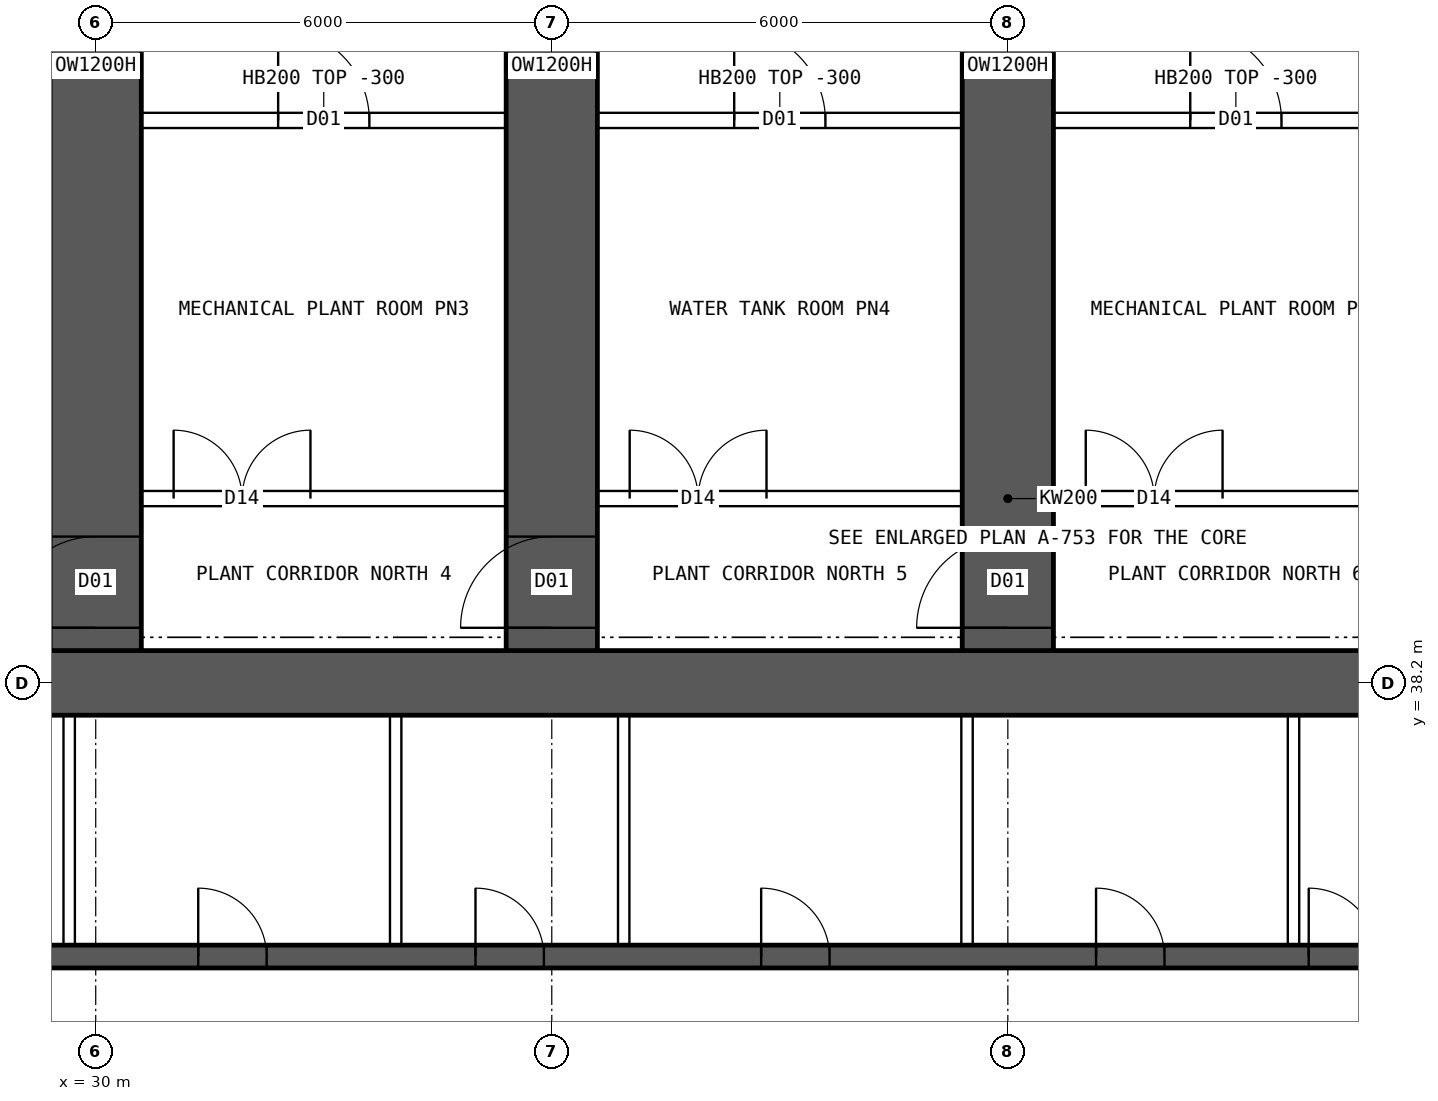
"""IFC4 building model, lengths in metres.
Left out: names, types, materials, properties, quantities, classifications, styles, units other than length and angle.
Written with IfcOpenShell. Run it as: python <this file> out.ifc"""

import sys

from ifc_helpers import new_model, si_unit, direction, frame, frame_2d, origin, place, context, subcontext, project, spatial, rectangle, extrude, element, fill, save


model = new_model("IFC4")
c1 = context("Model", 3, precision=1e-05, world=origin(), true_north=direction((0.0, 1.0)))
c2 = subcontext(c1, "Body", "Model", "MODEL_VIEW")
j1 = project(units=[si_unit("LENGTHUNIT", "METRE"), si_unit("PLANEANGLEUNIT", "RADIAN")], contexts=[c1])
p1 = place(None, origin())
s1 = spatial("IfcSite", under=j1, at=p1, CompositionType="ELEMENT")
p2 = place(p1, origin())
s2 = spatial("IfcBuilding", under=s1, at=p2, CompositionType="ELEMENT")
p3 = place(p2, frame((0.0, 0.0, 201.1)))
s3 = spatial("IfcBuildingStorey", under=s2, at=p3, CompositionType="ELEMENT", Elevation=201.1)
p4 = place(p3, frame((18.0, 38.2, 0.0), z_axis=(0.0, 0.0, 1.0), x_axis=(1.0, 0.0, 0.0)))
e1 = element("IfcWall", 1, at=p4, inside=s3, PredefinedType="SHEAR", context=c2, shape_type="SweptSolid", body=[
    extrude(rectangle(XDim=48.0, YDim=0.85, at=frame_2d((24.0, 0.0))), origin(), (0.0, 0.0, 1.0), 7.2),
])
p5 = place(p3, frame((18.425, 34.6, 0.0), z_axis=(0.0, 0.0, 1.0), x_axis=(1.0, 0.0, 0.0)))
e2 = element("IfcWall", 2, at=p5, inside=s3, PredefinedType="SHEAR", context=c2, shape_type="SweptSolid", body=[
    extrude(rectangle(XDim=47.15, YDim=0.3, at=frame_2d((23.575, 0.0))), origin(), (0.0, 0.0, 1.0), 7.2),
])
p6 = place(p5, frame((0.9, 0.0, 0.0)))
e3 = element("IfcOpeningElement", 3, at=p6, cuts=e2, PredefinedType="OPENING", context=c2, shape_type="SweptSolid", body=[
    extrude(rectangle(XDim=1.1, YDim=2.1, at=frame_2d((0.55, 1.05))), frame((0.0, 0.16, 0.0), z_axis=(0.0, -1.0, 0.0), x_axis=(1.0, 0.0, 0.0)), (0.0, 0.0, 1.0), 0.32),
])
p7 = place(p5, frame((45.15, 0.0, 0.0)))
e4 = element("IfcOpeningElement", 4, at=p7, cuts=e2, PredefinedType="OPENING", context=c2, shape_type="SweptSolid", body=[
    extrude(rectangle(XDim=1.1, YDim=2.1, at=frame_2d((0.55, 1.05))), frame((0.0, 0.16, 0.0), z_axis=(0.0, -1.0, 0.0), x_axis=(1.0, 0.0, 0.0)), (0.0, 0.0, 1.0), 0.32),
])
p8 = place(p5, frame((4.175, 0.0, 0.0)))
e5 = element("IfcOpeningElement", 5, at=p8, cuts=e2, PredefinedType="OPENING", context=c2, shape_type="SweptSolid", body=[
    extrude(rectangle(XDim=0.9, YDim=2.1, at=frame_2d((0.45, 1.05))), frame((0.0, 0.16, 0.0), z_axis=(0.0, -1.0, 0.0), x_axis=(1.0, 0.0, 0.0)), (0.0, 0.0, 1.0), 0.32),
])
p9 = place(p5, frame((42.075, 0.0, 0.0)))
e6 = element("IfcOpeningElement", 6, at=p9, cuts=e2, PredefinedType="OPENING", context=c2, shape_type="SweptSolid", body=[
    extrude(rectangle(XDim=0.9, YDim=2.1, at=frame_2d((0.45, 1.05))), frame((0.0, 0.16, 0.0), z_axis=(0.0, -1.0, 0.0), x_axis=(1.0, 0.0, 0.0)), (0.0, 0.0, 1.0), 0.32),
])
p10 = place(p5, frame((8.95, 0.0, 0.0)))
e7 = element("IfcOpeningElement", 7, at=p10, cuts=e2, PredefinedType="OPENING", context=c2, shape_type="SweptSolid", body=[
    extrude(rectangle(XDim=0.9, YDim=2.1, at=frame_2d((0.45, 1.05))), frame((0.0, 0.16, 0.0), z_axis=(0.0, -1.0, 0.0), x_axis=(1.0, 0.0, 0.0)), (0.0, 0.0, 1.0), 0.32),
])
p11 = place(p5, frame((12.924, 0.0, 0.0)))
e8 = element("IfcOpeningElement", 8, at=p11, cuts=e2, PredefinedType="OPENING", context=c2, shape_type="SweptSolid", body=[
    extrude(rectangle(XDim=0.9, YDim=2.1, at=frame_2d((0.45, 1.05))), frame((0.0, 0.16, 0.0), z_axis=(0.0, -1.0, 0.0), x_axis=(1.0, 0.0, 0.0)), (0.0, 0.0, 1.0), 0.32),
])
p12 = place(p5, frame((16.571, 0.0, 0.0)))
e9 = element("IfcOpeningElement", 9, at=p12, cuts=e2, PredefinedType="OPENING", context=c2, shape_type="SweptSolid", body=[
    extrude(rectangle(XDim=0.9, YDim=2.1, at=frame_2d((0.45, 1.05))), frame((0.0, 0.16, 0.0), z_axis=(0.0, -1.0, 0.0), x_axis=(1.0, 0.0, 0.0)), (0.0, 0.0, 1.0), 0.32),
])
p13 = place(p5, frame((20.33, 0.0, 0.0)))
e10 = element("IfcOpeningElement", 10, at=p13, cuts=e2, PredefinedType="OPENING", context=c2, shape_type="SweptSolid", body=[
    extrude(rectangle(XDim=0.9, YDim=2.1, at=frame_2d((0.45, 1.05))), frame((0.0, 0.16, 0.0), z_axis=(0.0, -1.0, 0.0), x_axis=(1.0, 0.0, 0.0)), (0.0, 0.0, 1.0), 0.32),
])
p14 = place(p5, frame((24.736, 0.0, 0.0)))
e11 = element("IfcOpeningElement", 11, at=p14, cuts=e2, PredefinedType="OPENING", context=c2, shape_type="SweptSolid", body=[
    extrude(rectangle(XDim=0.9, YDim=2.1, at=frame_2d((0.45, 1.05))), frame((0.0, 0.16, 0.0), z_axis=(0.0, -1.0, 0.0), x_axis=(1.0, 0.0, 0.0)), (0.0, 0.0, 1.0), 0.32),
])
p15 = place(p5, frame((27.533, 0.0, 0.0)))
e12 = element("IfcOpeningElement", 12, at=p15, cuts=e2, PredefinedType="OPENING", context=c2, shape_type="SweptSolid", body=[
    extrude(rectangle(XDim=0.9, YDim=2.1, at=frame_2d((0.45, 1.05))), frame((0.0, 0.16, 0.0), z_axis=(0.0, -1.0, 0.0), x_axis=(1.0, 0.0, 0.0)), (0.0, 0.0, 1.0), 0.32),
])
p16 = place(p5, frame((29.906, 0.0, 0.0)))
e13 = element("IfcOpeningElement", 13, at=p16, cuts=e2, PredefinedType="OPENING", context=c2, shape_type="SweptSolid", body=[
    extrude(rectangle(XDim=0.9, YDim=2.1, at=frame_2d((0.45, 1.05))), frame((0.0, 0.16, 0.0), z_axis=(0.0, -1.0, 0.0), x_axis=(1.0, 0.0, 0.0)), (0.0, 0.0, 1.0), 0.32),
])
p17 = place(p5, frame((35.376, 0.0, 0.0)))
e14 = element("IfcOpeningElement", 14, at=p17, cuts=e2, PredefinedType="OPENING", context=c2, shape_type="SweptSolid", body=[
    extrude(rectangle(XDim=0.9, YDim=2.1, at=frame_2d((0.45, 1.05))), frame((0.0, 0.16, 0.0), z_axis=(0.0, -1.0, 0.0), x_axis=(1.0, 0.0, 0.0)), (0.0, 0.0, 1.0), 0.32),
])
p18 = place(p3, frame((30.0, 38.625, 0.0), z_axis=(0.0, 0.0, 1.0), x_axis=(0.0, 1.0, 0.0)))
e15 = element("IfcWall", 15, at=p18, inside=s3, PredefinedType="SHEAR", context=c2, shape_type="SweptSolid", body=[
    extrude(rectangle(XDim=15.375, YDim=1.2, at=frame_2d((7.688, 0.0))), origin(), (0.0, 0.0, 1.0), 7.2),
])
p19 = place(p18, frame((0.3, 0.0, 0.0)))
e16 = element("IfcOpeningElement", 16, at=p19, cuts=e15, PredefinedType="OPENING", context=c2, shape_type="SweptSolid", body=[
    extrude(rectangle(XDim=1.2, YDim=2.1, at=frame_2d((0.6, 1.05))), frame((0.0, 0.61, 0.0), z_axis=(0.0, -1.0, 0.0), x_axis=(1.0, 0.0, 0.0)), (0.0, 0.0, 1.0), 1.22),
])
p20 = place(p3, frame((36.0, 38.625, 0.0), z_axis=(0.0, 0.0, 1.0), x_axis=(0.0, 1.0, 0.0)))
e17 = element("IfcWall", 17, at=p20, inside=s3, PredefinedType="SHEAR", context=c2, shape_type="SweptSolid", body=[
    extrude(rectangle(XDim=15.375, YDim=1.2, at=frame_2d((7.688, 0.0))), origin(), (0.0, 0.0, 1.0), 7.2),
])
p21 = place(p20, frame((0.3, 0.0, 0.0)))
e18 = element("IfcOpeningElement", 18, at=p21, cuts=e17, PredefinedType="OPENING", context=c2, shape_type="SweptSolid", body=[
    extrude(rectangle(XDim=1.2, YDim=2.1, at=frame_2d((0.6, 1.05))), frame((0.0, 0.61, 0.0), z_axis=(0.0, -1.0, 0.0), x_axis=(1.0, 0.0, 0.0)), (0.0, 0.0, 1.0), 1.22),
])
p22 = place(p3, frame((42.0, 38.625, 0.0), z_axis=(0.0, 0.0, 1.0), x_axis=(0.0, 1.0, 0.0)))
e19 = element("IfcWall", 19, at=p22, inside=s3, PredefinedType="SHEAR", context=c2, shape_type="SweptSolid", body=[
    extrude(rectangle(XDim=15.375, YDim=1.2, at=frame_2d((7.688, 0.0))), origin(), (0.0, 0.0, 1.0), 7.2),
])
p23 = place(p22, frame((0.3, 0.0, 0.0)))
e20 = element("IfcOpeningElement", 20, at=p23, cuts=e19, PredefinedType="OPENING", context=c2, shape_type="SweptSolid", body=[
    extrude(rectangle(XDim=1.2, YDim=2.1, at=frame_2d((0.6, 1.05))), frame((0.0, 0.61, 0.0), z_axis=(0.0, -1.0, 0.0), x_axis=(1.0, 0.0, 0.0)), (0.0, 0.0, 1.0), 1.22),
])
for number, where, z_axis, x_axis in (
    (21, (29.651, 34.75, 0.0), (0.0, 0.0, 1.0), (0.0, 1.0, 0.0)),
    (22, (33.946, 34.75, 0.0), (0.0, 0.0, 1.0), (0.0, 1.0, 0.0)),
    (23, (36.946, 34.75, 0.0), (0.0, 0.0, 1.0), (0.0, 1.0, 0.0)),
    (24, (41.463, 34.75, 0.0), (0.0, 0.0, 1.0), (0.0, 1.0, 0.0)),
    (25, (45.758, 34.75, 0.0), (0.0, 0.0, 1.0), (0.0, 1.0, 0.0)),
):
    element("IfcWall", number, at=place(p3, frame(where, z_axis=z_axis, x_axis=x_axis)), inside=s3, PredefinedType="SOLIDWALL", context=c2, shape_type="SweptSolid", body=[
        extrude(rectangle(XDim=3.025, YDim=0.15, at=frame_2d((1.512, 0.0))), origin(), (0.0, 0.0, 1.0), 6.9),
    ])
p24 = place(p3, frame((15.6, 40.625, 0.0), z_axis=(0.0, 0.0, 1.0), x_axis=(1.0, 0.0, 0.0)))
e26 = element("IfcWall", 26, at=p24, inside=s3, PredefinedType="SOLIDWALL", context=c2, shape_type="SweptSolid", body=[
    extrude(rectangle(XDim=52.8, YDim=0.2, at=frame_2d((26.4, 0.0))), origin(), (0.0, 0.0, 1.0), 6.9),
])
p25 = place(p24, frame((0.6, 0.0, 0.0)))
e27 = element("IfcOpeningElement", 27, at=p25, cuts=e26, PredefinedType="OPENING", context=c2, shape_type="SweptSolid", body=[
    extrude(rectangle(XDim=1.2, YDim=2.1, at=frame_2d((0.6, 1.05))), frame((0.0, 0.11, 0.0), z_axis=(0.0, -1.0, 0.0), x_axis=(1.0, 0.0, 0.0)), (0.0, 0.0, 1.0), 0.22),
])
p26 = place(p24, frame((3.425, 0.0, 0.0)))
e28 = element("IfcOpeningElement", 28, at=p26, cuts=e26, PredefinedType="OPENING", context=c2, shape_type="SweptSolid", body=[
    extrude(rectangle(XDim=1.8, YDim=2.4, at=frame_2d((0.9, 1.2))), frame((0.0, 0.11, 0.0), z_axis=(0.0, -1.0, 0.0), x_axis=(1.0, 0.0, 0.0)), (0.0, 0.0, 1.0), 0.22),
])
p27 = place(p24, frame((9.425, 0.0, 0.0)))
e29 = element("IfcOpeningElement", 29, at=p27, cuts=e26, PredefinedType="OPENING", context=c2, shape_type="SweptSolid", body=[
    extrude(rectangle(XDim=1.8, YDim=2.4, at=frame_2d((0.9, 1.2))), frame((0.0, 0.11, 0.0), z_axis=(0.0, -1.0, 0.0), x_axis=(1.0, 0.0, 0.0)), (0.0, 0.0, 1.0), 0.22),
])
p28 = place(p24, frame((15.425, 0.0, 0.0)))
e30 = element("IfcOpeningElement", 30, at=p28, cuts=e26, PredefinedType="OPENING", context=c2, shape_type="SweptSolid", body=[
    extrude(rectangle(XDim=1.8, YDim=2.4, at=frame_2d((0.9, 1.2))), frame((0.0, 0.11, 0.0), z_axis=(0.0, -1.0, 0.0), x_axis=(1.0, 0.0, 0.0)), (0.0, 0.0, 1.0), 0.22),
])
p29 = place(p24, frame((21.425, 0.0, 0.0)))
e31 = element("IfcOpeningElement", 31, at=p29, cuts=e26, PredefinedType="OPENING", context=c2, shape_type="SweptSolid", body=[
    extrude(rectangle(XDim=1.8, YDim=2.4, at=frame_2d((0.9, 1.2))), frame((0.0, 0.11, 0.0), z_axis=(0.0, -1.0, 0.0), x_axis=(1.0, 0.0, 0.0)), (0.0, 0.0, 1.0), 0.22),
])
p30 = place(p24, frame((27.425, 0.0, 0.0)))
e32 = element("IfcOpeningElement", 32, at=p30, cuts=e26, PredefinedType="OPENING", context=c2, shape_type="SweptSolid", body=[
    extrude(rectangle(XDim=1.8, YDim=2.4, at=frame_2d((0.9, 1.2))), frame((0.0, 0.11, 0.0), z_axis=(0.0, -1.0, 0.0), x_axis=(1.0, 0.0, 0.0)), (0.0, 0.0, 1.0), 0.22),
])
p31 = place(p24, frame((33.425, 0.0, 0.0)))
e33 = element("IfcOpeningElement", 33, at=p31, cuts=e26, PredefinedType="OPENING", context=c2, shape_type="SweptSolid", body=[
    extrude(rectangle(XDim=1.8, YDim=2.4, at=frame_2d((0.9, 1.2))), frame((0.0, 0.11, 0.0), z_axis=(0.0, -1.0, 0.0), x_axis=(1.0, 0.0, 0.0)), (0.0, 0.0, 1.0), 0.22),
])
p32 = place(p24, frame((39.425, 0.0, 0.0)))
e34 = element("IfcOpeningElement", 34, at=p32, cuts=e26, PredefinedType="OPENING", context=c2, shape_type="SweptSolid", body=[
    extrude(rectangle(XDim=1.8, YDim=2.4, at=frame_2d((0.9, 1.2))), frame((0.0, 0.11, 0.0), z_axis=(0.0, -1.0, 0.0), x_axis=(1.0, 0.0, 0.0)), (0.0, 0.0, 1.0), 0.22),
])
p33 = place(p24, frame((45.425, 0.0, 0.0)))
e35 = element("IfcOpeningElement", 35, at=p33, cuts=e26, PredefinedType="OPENING", context=c2, shape_type="SweptSolid", body=[
    extrude(rectangle(XDim=1.8, YDim=2.4, at=frame_2d((0.9, 1.2))), frame((0.0, 0.11, 0.0), z_axis=(0.0, -1.0, 0.0), x_axis=(1.0, 0.0, 0.0)), (0.0, 0.0, 1.0), 0.22),
])
p34 = place(p24, frame((51.425, 0.0, 0.0)))
e36 = element("IfcOpeningElement", 36, at=p34, cuts=e26, PredefinedType="OPENING", context=c2, shape_type="SweptSolid", body=[
    extrude(rectangle(XDim=1.2, YDim=2.1, at=frame_2d((0.6, 1.05))), frame((0.0, 0.11, 0.0), z_axis=(0.0, -1.0, 0.0), x_axis=(1.0, 0.0, 0.0)), (0.0, 0.0, 1.0), 0.22),
])
p35 = place(p3, frame((24.425, 45.6, 0.0), z_axis=(0.0, 0.0, 1.0), x_axis=(1.0, 0.0, 0.0)))
e37 = element("IfcWall", 37, at=p35, inside=s3, PredefinedType="SOLIDWALL", context=c2, shape_type="SweptSolid", body=[
    extrude(rectangle(XDim=5.15, YDim=0.2, at=frame_2d((2.575, 0.0))), origin(), (0.0, 0.0, 1.0), 6.9),
])
p36 = place(p35, frame((1.975, 0.0, 0.0)))
e38 = element("IfcOpeningElement", 38, at=p36, cuts=e37, PredefinedType="OPENING", context=c2, shape_type="SweptSolid", body=[
    extrude(rectangle(XDim=1.2, YDim=2.1, at=frame_2d((0.6, 1.05))), frame((0.0, 0.11, 0.0), z_axis=(0.0, -1.0, 0.0), x_axis=(1.0, 0.0, 0.0)), (0.0, 0.0, 1.0), 0.22),
])
p37 = place(p3, frame((30.425, 45.6, 0.0), z_axis=(0.0, 0.0, 1.0), x_axis=(1.0, 0.0, 0.0)))
e39 = element("IfcWall", 39, at=p37, inside=s3, PredefinedType="SOLIDWALL", context=c2, shape_type="SweptSolid", body=[
    extrude(rectangle(XDim=5.15, YDim=0.2, at=frame_2d((2.575, 0.0))), origin(), (0.0, 0.0, 1.0), 6.9),
])
p38 = place(p37, frame((1.975, 0.0, 0.0)))
e40 = element("IfcOpeningElement", 40, at=p38, cuts=e39, PredefinedType="OPENING", context=c2, shape_type="SweptSolid", body=[
    extrude(rectangle(XDim=1.2, YDim=2.1, at=frame_2d((0.6, 1.05))), frame((0.0, 0.11, 0.0), z_axis=(0.0, -1.0, 0.0), x_axis=(1.0, 0.0, 0.0)), (0.0, 0.0, 1.0), 0.22),
])
p39 = place(p3, frame((36.425, 45.6, 0.0), z_axis=(0.0, 0.0, 1.0), x_axis=(1.0, 0.0, 0.0)))
e41 = element("IfcWall", 41, at=p39, inside=s3, PredefinedType="SOLIDWALL", context=c2, shape_type="SweptSolid", body=[
    extrude(rectangle(XDim=5.15, YDim=0.2, at=frame_2d((2.575, 0.0))), origin(), (0.0, 0.0, 1.0), 6.9),
])
p40 = place(p39, frame((1.975, 0.0, 0.0)))
e42 = element("IfcOpeningElement", 42, at=p40, cuts=e41, PredefinedType="OPENING", context=c2, shape_type="SweptSolid", body=[
    extrude(rectangle(XDim=1.2, YDim=2.1, at=frame_2d((0.6, 1.05))), frame((0.0, 0.11, 0.0), z_axis=(0.0, -1.0, 0.0), x_axis=(1.0, 0.0, 0.0)), (0.0, 0.0, 1.0), 0.22),
])
p41 = place(p3, frame((42.425, 45.6, 0.0), z_axis=(0.0, 0.0, 1.0), x_axis=(1.0, 0.0, 0.0)))
e43 = element("IfcWall", 43, at=p41, inside=s3, PredefinedType="SOLIDWALL", context=c2, shape_type="SweptSolid", body=[
    extrude(rectangle(XDim=5.15, YDim=0.2, at=frame_2d((2.575, 0.0))), origin(), (0.0, 0.0, 1.0), 6.9),
])
p42 = place(p41, frame((1.975, 0.0, 0.0)))
e44 = element("IfcOpeningElement", 44, at=p42, cuts=e43, PredefinedType="OPENING", context=c2, shape_type="SweptSolid", body=[
    extrude(rectangle(XDim=1.2, YDim=2.1, at=frame_2d((0.6, 1.05))), frame((0.0, 0.11, 0.0), z_axis=(0.0, -1.0, 0.0), x_axis=(1.0, 0.0, 0.0)), (0.0, 0.0, 1.0), 0.22),
])
p43 = place(p11, origin())
e45 = element("IfcDoor", 45, at=p43, inside=s3, OperationType="SINGLE_SWING_LEFT", PredefinedType="DOOR", context=c2, shape_type="SweptSolid", body=[
    extrude(rectangle(XDim=0.9, YDim=2.1, at=frame_2d((0.45, 1.05))), frame((0.0, 0.025, 0.0), z_axis=(0.0, -1.0, 0.0), x_axis=(1.0, 0.0, 0.0)), (0.0, 0.0, 1.0), 0.05),
])
fill(e8, e45)
p44 = place(p12, origin())
e46 = element("IfcDoor", 46, at=p44, inside=s3, OperationType="SINGLE_SWING_LEFT", PredefinedType="DOOR", context=c2, shape_type="SweptSolid", body=[
    extrude(rectangle(XDim=0.9, YDim=2.1, at=frame_2d((0.45, 1.05))), frame((0.0, 0.025, 0.0), z_axis=(0.0, -1.0, 0.0), x_axis=(1.0, 0.0, 0.0)), (0.0, 0.0, 1.0), 0.05),
])
fill(e9, e46)
p45 = place(p13, origin())
e47 = element("IfcDoor", 47, at=p45, inside=s3, OperationType="SINGLE_SWING_LEFT", PredefinedType="DOOR", context=c2, shape_type="SweptSolid", body=[
    extrude(rectangle(XDim=0.9, YDim=2.1, at=frame_2d((0.45, 1.05))), frame((0.0, 0.025, 0.0), z_axis=(0.0, -1.0, 0.0), x_axis=(1.0, 0.0, 0.0)), (0.0, 0.0, 1.0), 0.05),
])
fill(e10, e47)
p46 = place(p14, origin())
e48 = element("IfcDoor", 48, at=p46, inside=s3, OperationType="SINGLE_SWING_LEFT", PredefinedType="DOOR", context=c2, shape_type="SweptSolid", body=[
    extrude(rectangle(XDim=0.9, YDim=2.1, at=frame_2d((0.45, 1.05))), frame((0.0, 0.025, 0.0), z_axis=(0.0, -1.0, 0.0), x_axis=(1.0, 0.0, 0.0)), (0.0, 0.0, 1.0), 0.05),
])
fill(e11, e48)
p47 = place(p15, origin())
e49 = element("IfcDoor", 49, at=p47, inside=s3, OperationType="SINGLE_SWING_LEFT", PredefinedType="DOOR", context=c2, shape_type="SweptSolid", body=[
    extrude(rectangle(XDim=0.9, YDim=2.1, at=frame_2d((0.45, 1.05))), frame((0.0, 0.025, 0.0), z_axis=(0.0, -1.0, 0.0), x_axis=(1.0, 0.0, 0.0)), (0.0, 0.0, 1.0), 0.05),
])
fill(e12, e49)
p48 = place(p38, origin())
e50 = element("IfcDoor", 50, at=p48, inside=s3, OperationType="SINGLE_SWING_LEFT", PredefinedType="DOOR", context=c2, shape_type="SweptSolid", body=[
    extrude(rectangle(XDim=1.2, YDim=2.1, at=frame_2d((0.6, 1.05))), frame((0.0, 0.025, 0.0), z_axis=(0.0, -1.0, 0.0), x_axis=(1.0, 0.0, 0.0)), (0.0, 0.0, 1.0), 0.05),
])
fill(e40, e50)
p49 = place(p40, origin())
e51 = element("IfcDoor", 51, at=p49, inside=s3, OperationType="SINGLE_SWING_LEFT", PredefinedType="DOOR", context=c2, shape_type="SweptSolid", body=[
    extrude(rectangle(XDim=1.2, YDim=2.1, at=frame_2d((0.6, 1.05))), frame((0.0, 0.025, 0.0), z_axis=(0.0, -1.0, 0.0), x_axis=(1.0, 0.0, 0.0)), (0.0, 0.0, 1.0), 0.05),
])
fill(e42, e51)
p50 = place(p42, origin())
e52 = element("IfcDoor", 52, at=p50, inside=s3, OperationType="SINGLE_SWING_LEFT", PredefinedType="DOOR", context=c2, shape_type="SweptSolid", body=[
    extrude(rectangle(XDim=1.2, YDim=2.1, at=frame_2d((0.6, 1.05))), frame((0.0, 0.025, 0.0), z_axis=(0.0, -1.0, 0.0), x_axis=(1.0, 0.0, 0.0)), (0.0, 0.0, 1.0), 0.05),
])
fill(e44, e52)
p51 = place(p28, origin())
e53 = element("IfcDoor", 53, at=p51, inside=s3, OperationType="DOUBLE_DOOR_SINGLE_SWING", PredefinedType="DOOR", context=c2, shape_type="SweptSolid", body=[
    extrude(rectangle(XDim=1.8, YDim=2.4, at=frame_2d((0.9, 1.2))), frame((0.0, 0.025, 0.0), z_axis=(0.0, -1.0, 0.0), x_axis=(1.0, 0.0, 0.0)), (0.0, 0.0, 1.0), 0.05),
])
fill(e30, e53)
p52 = place(p29, origin())
e54 = element("IfcDoor", 54, at=p52, inside=s3, OperationType="DOUBLE_DOOR_SINGLE_SWING", PredefinedType="DOOR", context=c2, shape_type="SweptSolid", body=[
    extrude(rectangle(XDim=1.8, YDim=2.4, at=frame_2d((0.9, 1.2))), frame((0.0, 0.025, 0.0), z_axis=(0.0, -1.0, 0.0), x_axis=(1.0, 0.0, 0.0)), (0.0, 0.0, 1.0), 0.05),
])
fill(e31, e54)
p53 = place(p30, origin())
e55 = element("IfcDoor", 55, at=p53, inside=s3, OperationType="DOUBLE_DOOR_SINGLE_SWING", PredefinedType="DOOR", context=c2, shape_type="SweptSolid", body=[
    extrude(rectangle(XDim=1.8, YDim=2.4, at=frame_2d((0.9, 1.2))), frame((0.0, 0.025, 0.0), z_axis=(0.0, -1.0, 0.0), x_axis=(1.0, 0.0, 0.0)), (0.0, 0.0, 1.0), 0.05),
])
fill(e32, e55)
p54 = place(p19, origin())
e56 = element("IfcDoor", 56, at=p54, inside=s3, OperationType="SINGLE_SWING_LEFT", PredefinedType="DOOR", context=c2, shape_type="SweptSolid", body=[
    extrude(rectangle(XDim=1.2, YDim=2.1, at=frame_2d((0.6, 1.05))), frame((0.0, 0.025, 0.0), z_axis=(0.0, -1.0, 0.0), x_axis=(1.0, 0.0, 0.0)), (0.0, 0.0, 1.0), 0.05),
])
fill(e16, e56)
p55 = place(p21, origin())
e57 = element("IfcDoor", 57, at=p55, inside=s3, OperationType="SINGLE_SWING_LEFT", PredefinedType="DOOR", context=c2, shape_type="SweptSolid", body=[
    extrude(rectangle(XDim=1.2, YDim=2.1, at=frame_2d((0.6, 1.05))), frame((0.0, 0.025, 0.0), z_axis=(0.0, -1.0, 0.0), x_axis=(1.0, 0.0, 0.0)), (0.0, 0.0, 1.0), 0.05),
])
fill(e18, e57)
p56 = place(p23, origin())
e58 = element("IfcDoor", 58, at=p56, inside=s3, OperationType="SINGLE_SWING_LEFT", PredefinedType="DOOR", context=c2, shape_type="SweptSolid", body=[
    extrude(rectangle(XDim=1.2, YDim=2.1, at=frame_2d((0.6, 1.05))), frame((0.0, 0.025, 0.0), z_axis=(0.0, -1.0, 0.0), x_axis=(1.0, 0.0, 0.0)), (0.0, 0.0, 1.0), 0.05),
])
fill(e20, e58)
save(model, sys.argv[1])
